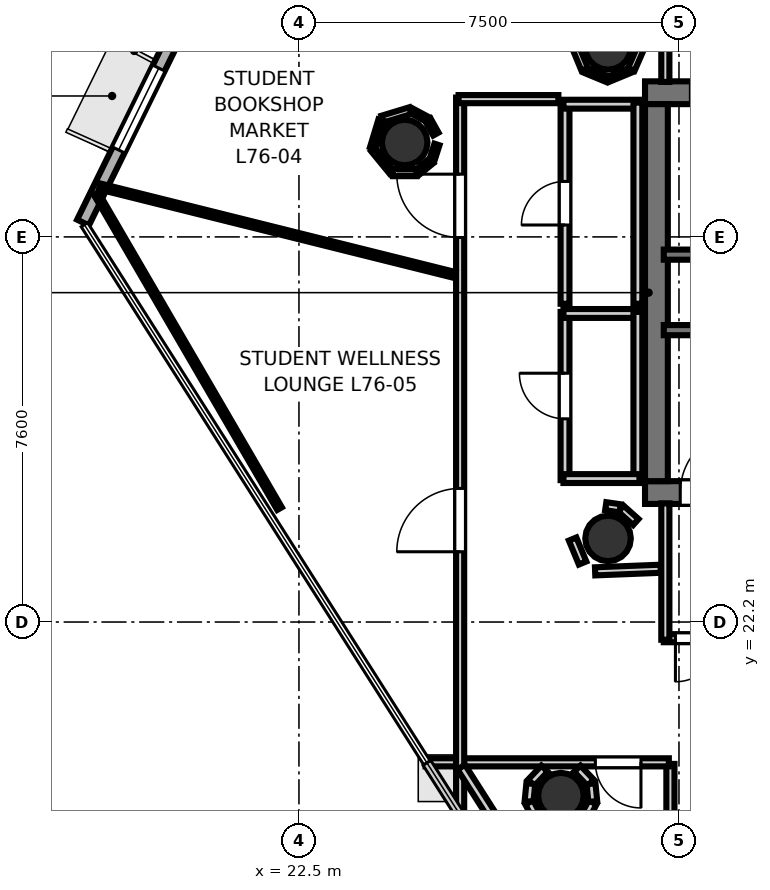
"""IFC4 building model, lengths in metres.
Left out: names, types, materials, properties, quantities, classifications, styles, units other than length and angle.
Written with IfcOpenShell. Run it as: python <this file> out.ifc"""

import sys

from ifc_helpers import new_model, si_unit, direction, frame, frame_2d, origin, origin_2d, place, context, subcontext, project, spatial, rectangle, hollow_circle, extrude, element, fill, save


model = new_model("IFC4")
c1 = context("Model", 3, precision=1e-05, world=origin(), true_north=direction((0.0, 1.0)))
c2 = subcontext(c1, "Body", "Model", "MODEL_VIEW")
j1 = project(units=[si_unit("LENGTHUNIT", "METRE"), si_unit("PLANEANGLEUNIT", "RADIAN")], contexts=[c1])
p1 = place(None, origin())
s1 = spatial("IfcSite", under=j1, at=p1, CompositionType="ELEMENT")
p2 = place(p1, origin())
s2 = spatial("IfcBuilding", under=s1, at=p2, CompositionType="ELEMENT")
p3 = place(p2, frame((0.0, 0.0, 295.4)))
s3 = spatial("IfcBuildingStorey", under=s2, at=p3, CompositionType="ELEMENT", Elevation=295.4)
p4 = place(p3, frame((29.33, 32.645, 0.0), z_axis=(0.0, 0.0, 1.0), x_axis=(1.0, 0.0, 0.0)))
e1 = element("IfcWall", 1, at=p4, inside=s3, PredefinedType="SHEAR", context=c2, shape_type="SweptSolid", body=[
    extrude(rectangle(XDim=10.52, YDim=0.45, at=frame_2d((5.26, 0.0))), origin(), (0.0, 0.0, 1.0), 3.52),
])
p5 = place(p4, frame((0.895, 0.0, 0.0)))
e2 = element("IfcOpeningElement", 2, at=p5, cuts=e1, PredefinedType="OPENING", context=c2, shape_type="SweptSolid", body=[
    extrude(rectangle(XDim=1.25, YDim=2.15, at=frame_2d((0.625, 1.075))), frame((0.0, 0.235, 0.0), z_axis=(0.0, -1.0, 0.0), x_axis=(1.0, 0.0, 0.0)), (0.0, 0.0, 1.0), 0.47),
])
p6 = place(p3, frame((29.33, 24.755, 0.0), z_axis=(0.0, 0.0, 1.0), x_axis=(1.0, 0.0, 0.0)))
e3 = element("IfcWall", 3, at=p6, inside=s3, PredefinedType="SHEAR", context=c2, shape_type="SweptSolid", body=[
    extrude(rectangle(XDim=10.52, YDim=0.45, at=frame_2d((5.26, 0.0))), origin(), (0.0, 0.0, 1.0), 3.52),
])
p7 = place(p6, frame((0.695, 0.0, 0.0)))
e4 = element("IfcOpeningElement", 4, at=p7, cuts=e3, PredefinedType="OPENING", context=c2, shape_type="SweptSolid", body=[
    extrude(rectangle(XDim=1.25, YDim=2.15, at=frame_2d((0.625, 1.075))), frame((0.0, 0.235, 0.0), z_axis=(0.0, -1.0, 0.0), x_axis=(1.0, 0.0, 0.0)), (0.0, 0.0, 1.0), 0.47),
])
p8 = place(p3, frame((29.555, 24.98, 0.0), z_axis=(0.0, 0.0, 1.0), x_axis=(0.0, 1.0, 0.0)))
e5 = element("IfcWall", 5, at=p8, inside=s3, PredefinedType="SHEAR", context=c2, shape_type="SweptSolid", body=[
    extrude(rectangle(XDim=7.44, YDim=0.45, at=frame_2d((3.72, 0.0))), origin(), (0.0, 0.0, 1.0), 3.52),
])
for number, where, z_axis, x_axis in (
    (6, (28.6, 33.55, 0.0), (0.0, 0.0, 1.0), (1.0, 0.0, 0.0)),
    (7, (28.6, 23.85, 0.0), (0.0, 0.0, 1.0), (1.0, 0.0, 0.0)),
    (8, (24.587, 31.663, 0.0), (0.0, 0.0, 1.0), (1.0, 0.0, 0.0)),
    (9, (27.67, 18.774, 0.0), (0.0, 0.0, 1.0), (1.0, 0.0, 0.0)),
):
    element("IfcColumn", number, at=place(p3, frame(where, z_axis=z_axis, x_axis=x_axis)), inside=s3, PredefinedType="COLUMN", context=c2, shape_type="SweptSolid", body=[
        extrude(hollow_circle(Radius=0.45, WallThickness=0.025, at=origin_2d()), origin(), (0.0, 0.0, 1.0), 3.7),
    ])
p9 = place(p3, frame((20.436, 34.563, 0.0), z_axis=(0.0, 0.0, 1.0), x_axis=(-0.440488239438, -0.897758381145, 0.0)))
e10 = element("IfcWall", 10, at=p9, inside=s3, PredefinedType="SOLIDWALL", context=c2, shape_type="SweptSolid", body=[
    extrude(rectangle(XDim=4.99, YDim=0.26, at=frame_2d((2.495, 0.0))), origin(), (0.0, 0.0, 1.0), 3.52),
])
p10 = place(p9, frame((1.595, 0.0, 0.85)))
e11 = element("IfcOpeningElement", 11, at=p10, cuts=e10, PredefinedType="OPENING", context=c2, shape_type="SweptSolid", body=[
    extrude(rectangle(XDim=1.8, YDim=2.1, at=frame_2d((0.9, 1.05))), frame((0.0, 0.14, 0.0), z_axis=(0.0, -1.0, 0.0), x_axis=(1.0, 0.0, 0.0)), (0.0, 0.0, 1.0), 0.28),
])
p11 = place(p3, frame((29.7, 29.45, 0.0), z_axis=(0.0, 0.0, 1.0), x_axis=(1.0, 0.0, 0.0)))
e12 = element("IfcWall", 12, at=p11, inside=s3, PredefinedType="SOLIDWALL", context=c2, shape_type="SweptSolid", body=[
    extrude(rectangle(XDim=8.3, YDim=0.2, at=frame_2d((4.15, 0.0))), origin(), (0.0, 0.0, 1.0), 3.52),
])
p12 = place(p3, frame((29.7, 27.96, 0.0), z_axis=(0.0, 0.0, 1.0), x_axis=(1.0, 0.0, 0.0)))
e13 = element("IfcWall", 13, at=p12, inside=s3, PredefinedType="SOLIDWALL", context=c2, shape_type="SweptSolid", body=[
    extrude(rectangle(XDim=7.75, YDim=0.2, at=frame_2d((3.875, 0.0))), origin(), (0.0, 0.0, 1.0), 3.52),
])
p13 = place(p3, frame((29.731, 32.858, 0.0), z_axis=(0.0, 0.0, 1.0), x_axis=(0.0, 1.0, 0.0)))
e14 = element("IfcWall", 14, at=p13, inside=s3, PredefinedType="PARTITIONING", context=c2, shape_type="SweptSolid", body=[
    extrude(rectangle(XDim=3.053, YDim=0.16, at=frame_2d((1.526, 0.0))), origin(), (0.0, 0.0, 1.0), 2.84),
])
p14 = place(p3, frame((33.45, 21.881, 0.0), z_axis=(0.0, 0.0, 1.0), x_axis=(-1.0, 0.0, 0.0)))
e15 = element("IfcWall", 15, at=p14, inside=s3, PredefinedType="PARTITIONING", context=c2, shape_type="SweptSolid", body=[
    extrude(rectangle(XDim=3.75, YDim=0.16, at=frame_2d((1.875, 0.0))), origin(), (0.0, 0.0, 1.0), 2.84),
])
p15 = place(p14, frame((1.275, 0.0, 0.0)))
e16 = element("IfcOpeningElement", 16, at=p15, cuts=e15, PredefinedType="OPENING", context=c2, shape_type="SweptSolid", body=[
    extrude(rectangle(XDim=1.2, YDim=2.15, at=frame_2d((0.6, 1.075))), frame((0.0, 0.09, 0.0), z_axis=(0.0, -1.0, 0.0), x_axis=(1.0, 0.0, 0.0)), (0.0, 0.0, 1.0), 0.18),
])
p16 = place(p14, frame((2.66, 0.0, 0.0)))
e17 = element("IfcOpeningElement", 17, at=p16, cuts=e15, PredefinedType="OPENING", context=c2, shape_type="SweptSolid", body=[
    extrude(rectangle(XDim=0.86, YDim=2.05, at=frame_2d((0.43, 1.025))), frame((0.0, 0.09, 0.0), z_axis=(0.0, -1.0, 0.0), x_axis=(1.0, 0.0, 0.0)), (0.0, 0.0, 1.0), 0.18),
])
p17 = place(p3, frame((29.731, 21.85, 0.0), z_axis=(0.0, 0.0, 1.0), x_axis=(0.0, 1.0, 0.0)))
e18 = element("IfcWall", 18, at=p17, inside=s3, PredefinedType="PARTITIONING", context=c2, shape_type="SweptSolid", body=[
    extrude(rectangle(XDim=2.692, YDim=0.16, at=frame_2d((1.346, 0.0))), origin(), (0.0, 0.0, 1.0), 2.84),
])
p18 = place(p3, frame((27.751, 25.0, 0.0), z_axis=(0.0, 0.0, 1.0), x_axis=(0.0, 1.0, 0.0)))
e19 = element("IfcWall", 19, at=p18, inside=s3, PredefinedType="PLUMBINGWALL", context=c2, shape_type="SweptSolid", body=[
    extrude(rectangle(XDim=3.32, YDim=0.175, at=frame_2d((1.66, 0.0))), origin(), (0.0, 0.0, 1.0), 2.84),
])
p19 = place(p18, frame((1.21, 0.0, 0.0)))
e20 = element("IfcOpeningElement", 20, at=p19, cuts=e19, PredefinedType="OPENING", context=c2, shape_type="SweptSolid", body=[
    extrude(rectangle(XDim=0.9, YDim=2.1, at=frame_2d((0.45, 1.05))), frame((0.0, 0.097, 0.0), z_axis=(0.0, -1.0, 0.0), x_axis=(1.0, 0.0, 0.0)), (0.0, 0.0, 1.0), 0.195),
])
p20 = place(p3, frame((27.72, 28.289, 0.0), z_axis=(0.0, 0.0, 1.0), x_axis=(1.0, 0.0, 0.0)))
e21 = element("IfcWall", 21, at=p20, inside=s3, PredefinedType="PLUMBINGWALL", context=c2, shape_type="SweptSolid", body=[
    extrude(rectangle(XDim=1.5, YDim=0.175, at=frame_2d((0.75, 0.0))), origin(), (0.0, 0.0, 1.0), 2.84),
])
p21 = place(p3, frame((29.189, 28.32, 0.0), z_axis=(0.0, 0.0, 1.0), x_axis=(0.0, -1.0, 0.0)))
e22 = element("IfcWall", 22, at=p21, inside=s3, PredefinedType="PLUMBINGWALL", context=c2, shape_type="SweptSolid", body=[
    extrude(rectangle(XDim=3.32, YDim=0.175, at=frame_2d((1.66, 0.0))), origin(), (0.0, 0.0, 1.0), 2.84),
])
p22 = place(p3, frame((29.22, 25.031, 0.0), z_axis=(0.0, 0.0, 1.0), x_axis=(-1.0, 0.0, 0.0)))
e23 = element("IfcWall", 23, at=p22, inside=s3, PredefinedType="PLUMBINGWALL", context=c2, shape_type="SweptSolid", body=[
    extrude(rectangle(XDim=1.5, YDim=0.175, at=frame_2d((0.75, 0.0))), origin(), (0.0, 0.0, 1.0), 2.84),
])
p23 = place(p3, frame((27.751, 28.48, 0.0), z_axis=(0.0, 0.0, 1.0), x_axis=(0.0, 1.0, 0.0)))
e24 = element("IfcWall", 24, at=p23, inside=s3, PredefinedType="PLUMBINGWALL", context=c2, shape_type="SweptSolid", body=[
    extrude(rectangle(XDim=3.97, YDim=0.175, at=frame_2d((1.985, 0.0))), origin(), (0.0, 0.0, 1.0), 2.84),
])
p24 = place(p23, frame((1.555, 0.0, 0.0)))
e25 = element("IfcOpeningElement", 25, at=p24, cuts=e24, PredefinedType="OPENING", context=c2, shape_type="SweptSolid", body=[
    extrude(rectangle(XDim=0.86, YDim=2.05, at=frame_2d((0.43, 1.025))), frame((0.0, 0.097, 0.0), z_axis=(0.0, -1.0, 0.0), x_axis=(1.0, 0.0, 0.0)), (0.0, 0.0, 1.0), 0.195),
])
p25 = place(p3, frame((27.72, 32.419, 0.0), z_axis=(0.0, 0.0, 1.0), x_axis=(1.0, 0.0, 0.0)))
e26 = element("IfcWall", 26, at=p25, inside=s3, PredefinedType="PLUMBINGWALL", context=c2, shape_type="SweptSolid", body=[
    extrude(rectangle(XDim=1.5, YDim=0.175, at=frame_2d((0.75, 0.0))), origin(), (0.0, 0.0, 1.0), 2.84),
])
p26 = place(p3, frame((29.189, 32.45, 0.0), z_axis=(0.0, 0.0, 1.0), x_axis=(0.0, -1.0, 0.0)))
e27 = element("IfcWall", 27, at=p26, inside=s3, PredefinedType="PLUMBINGWALL", context=c2, shape_type="SweptSolid", body=[
    extrude(rectangle(XDim=3.97, YDim=0.175, at=frame_2d((1.985, 0.0))), origin(), (0.0, 0.0, 1.0), 2.84),
])
p27 = place(p3, frame((29.149, 24.173, 0.0), z_axis=(0.0, 0.0, 1.0), x_axis=(-0.745225165416, 0.666812906917, 0.0)))
e28 = element("IfcWall", 28, at=p27, inside=s3, PredefinedType="PARTITIONING", context=c2, shape_type="SweptSolid", body=[
    extrude(rectangle(XDim=0.396, YDim=0.16, at=frame_2d((0.198, 0.0))), origin(), (0.0, 0.0, 1.0), 2.84),
])
p28 = place(p3, frame((28.838, 24.444, 0.0), z_axis=(0.0, 0.0, 1.0), x_axis=(-0.989449148305, 0.144880581578, 0.0)))
e29 = element("IfcWall", 29, at=p28, inside=s3, PredefinedType="PARTITIONING", context=c2, shape_type="SweptSolid", body=[
    extrude(rectangle(XDim=0.286, YDim=0.16, at=frame_2d((0.143, 0.0))), origin(), (0.0, 0.0, 1.0), 2.84),
])
p29 = place(p3, frame((27.901, 23.838, 0.0), z_axis=(0.0, 0.0, 1.0), x_axis=(0.382856448334, -0.923807847969, 0.0)))
e30 = element("IfcWall", 30, at=p29, inside=s3, PredefinedType="PARTITIONING", context=c2, shape_type="SweptSolid", body=[
    extrude(rectangle(XDim=0.513, YDim=0.16, at=frame_2d((0.256, 0.0))), origin(), (0.0, 0.0, 1.0), 2.84),
])
p30 = place(p3, frame((28.345, 23.2, 0.0), z_axis=(0.0, 0.0, 1.0), x_axis=(0.999216536924, 0.039576664043, 0.0)))
e31 = element("IfcWall", 31, at=p30, inside=s3, PredefinedType="PARTITIONING", context=c2, shape_type="SweptSolid", body=[
    extrude(rectangle(XDim=1.295, YDim=0.16, at=frame_2d((0.648, 0.0))), origin(), (0.0, 0.0, 1.0), 2.84),
])
p31 = place(p3, frame((29.831, 16.05, 0.0), z_axis=(0.0, 0.0, 1.0), x_axis=(0.0, 1.0, 0.0)))
e32 = element("IfcWall", 32, at=p31, inside=s3, PredefinedType="PARTITIONING", context=c2, shape_type="SweptSolid", body=[
    extrude(rectangle(XDim=3.35, YDim=0.16, at=frame_2d((1.675, 0.0))), origin(), (0.0, 0.0, 1.0), 2.84),
])
p32 = place(p3, frame((29.8, 19.431, 0.0), z_axis=(0.0, 0.0, 1.0), x_axis=(-1.0, 0.0, 0.0)))
e33 = element("IfcWall", 33, at=p32, inside=s3, PredefinedType="PARTITIONING", context=c2, shape_type="SweptSolid", body=[
    extrude(rectangle(XDim=4.801, YDim=0.16, at=frame_2d((2.4, 0.0))), origin(), (0.0, 0.0, 1.0), 2.84),
])
p33 = place(p32, frame((0.55, 0.0, 0.0)))
e34 = element("IfcOpeningElement", 34, at=p33, cuts=e33, PredefinedType="OPENING", context=c2, shape_type="SweptSolid", body=[
    extrude(rectangle(XDim=0.9, YDim=2.1, at=frame_2d((0.45, 1.05))), frame((0.0, 0.09, 0.0), z_axis=(0.0, -1.0, 0.0), x_axis=(1.0, 0.0, 0.0)), (0.0, 0.0, 1.0), 0.18),
])
p34 = place(p3, frame((25.681, 18.372, 0.0), z_axis=(0.0, 0.0, 1.0), x_axis=(0.0, 1.0, 0.0)))
e35 = element("IfcWall", 35, at=p34, inside=s3, PredefinedType="PARTITIONING", context=c2, shape_type="SweptSolid", body=[
    extrude(rectangle(XDim=14.178, YDim=0.16, at=frame_2d((7.089, 0.0))), origin(), (0.0, 0.0, 1.0), 2.84),
])
p35 = place(p34, frame((11.417, 0.0, 0.0)))
e36 = element("IfcOpeningElement", 36, at=p35, cuts=e35, PredefinedType="OPENING", context=c2, shape_type="SweptSolid", body=[
    extrude(rectangle(XDim=1.25, YDim=2.2, at=frame_2d((0.625, 1.1))), frame((0.0, 0.09, 0.0), z_axis=(0.0, -1.0, 0.0), x_axis=(1.0, 0.0, 0.0)), (0.0, 0.0, 1.0), 0.18),
])
p36 = place(p34, frame((5.215, 0.0, 0.0)))
e37 = element("IfcOpeningElement", 37, at=p36, cuts=e35, PredefinedType="OPENING", context=c2, shape_type="SweptSolid", body=[
    extrude(rectangle(XDim=1.25, YDim=2.2, at=frame_2d((0.625, 1.1))), frame((0.0, 0.09, 0.0), z_axis=(0.0, -1.0, 0.0), x_axis=(1.0, 0.0, 0.0)), (0.0, 0.0, 1.0), 0.18),
])
p37 = place(p3, frame((25.65, 32.519, 0.0), z_axis=(0.0, 0.0, 1.0), x_axis=(1.0, 0.0, 0.0)))
e38 = element("IfcWall", 38, at=p37, inside=s3, PredefinedType="PARTITIONING", context=c2, shape_type="SweptSolid", body=[
    extrude(rectangle(XDim=1.97, YDim=0.16, at=frame_2d((0.985, 0.0))), origin(), (0.0, 0.0, 1.0), 2.84),
])
p38 = place(p3, frame((29.231, 13.794, 0.0), z_axis=(0.0, 0.0, 1.0), x_axis=(-0.5370149386, 0.843572732916, 0.0)))
e39 = element("IfcWall", 39, at=p38, inside=s3, PredefinedType="PLUMBINGWALL", context=c2, shape_type="SweptSolid", body=[
    extrude(rectangle(XDim=6.57, YDim=0.175, at=frame_2d((3.285, 0.0))), origin(), (0.0, 0.0, 1.0), 2.095),
])
p39 = place(p3, frame((27.347, 19.306, 0.0), z_axis=(0.0, 0.0, 1.0), x_axis=(-0.68932010071, -0.724456899171, 0.0)))
e40 = element("IfcWall", 40, at=p39, inside=s3, PredefinedType="PLUMBINGWALL", context=c2, shape_type="SweptSolid", body=[
    extrude(rectangle(XDim=0.382, YDim=0.175, at=frame_2d((0.191, 0.0))), origin(), (0.0, 0.0, 1.0), 2.84),
])
p40 = place(p3, frame((27.076, 19.01, 0.0), z_axis=(0.0, 0.0, 1.0), x_axis=(-0.097865889817, -0.995199611942, 0.0)))
e41 = element("IfcWall", 41, at=p40, inside=s3, PredefinedType="PLUMBINGWALL", context=c2, shape_type="SweptSolid", body=[
    extrude(rectangle(XDim=0.354, YDim=0.175, at=frame_2d((0.177, 0.0))), origin(), (0.0, 0.0, 1.0), 2.095),
])
p41 = place(p3, frame((27.044, 18.64, 0.0), z_axis=(0.0, 0.0, 1.0), x_axis=(0.471053526925, -0.882104628019, 0.0)))
e42 = element("IfcWall", 42, at=p41, inside=s3, PredefinedType="PLUMBINGWALL", context=c2, shape_type="SweptSolid", body=[
    extrude(rectangle(XDim=0.354, YDim=0.175, at=frame_2d((0.177, 0.0))), origin(), (0.0, 0.0, 1.0), 2.095),
])
p42 = place(p3, frame((28.129, 18.328, 0.0), z_axis=(0.0, 0.0, 1.0), x_axis=(0.471589913721, 0.881817981942, 0.0)))
e43 = element("IfcWall", 43, at=p42, inside=s3, PredefinedType="PLUMBINGWALL", context=c2, shape_type="SweptSolid", body=[
    extrude(rectangle(XDim=0.354, YDim=0.175, at=frame_2d((0.177, 0.0))), origin(), (0.0, 0.0, 1.0), 2.84),
])
p43 = place(p3, frame((28.299, 18.658, 0.0), z_axis=(0.0, 0.0, 1.0), x_axis=(-0.097865889817, 0.995199611942, 0.0)))
e44 = element("IfcWall", 44, at=p43, inside=s3, PredefinedType="PLUMBINGWALL", context=c2, shape_type="SweptSolid", body=[
    extrude(rectangle(XDim=0.354, YDim=0.175, at=frame_2d((0.177, 0.0))), origin(), (0.0, 0.0, 1.0), 2.84),
])
p44 = place(p3, frame((28.256, 19.029, 0.0), z_axis=(0.0, 0.0, 1.0), x_axis=(-0.68932010071, 0.724456899171, 0.0)))
e45 = element("IfcWall", 45, at=p44, inside=s3, PredefinedType="PLUMBINGWALL", context=c2, shape_type="SweptSolid", body=[
    extrude(rectangle(XDim=0.382, YDim=0.175, at=frame_2d((0.191, 0.0))), origin(), (0.0, 0.0, 1.0), 2.84),
])
p45 = place(p3, frame((25.203, 31.829, 0.0), z_axis=(0.0, 0.0, 1.0), x_axis=(-0.488926990846, 0.872324708823, 0.0)))
e46 = element("IfcWall", 46, at=p45, inside=s3, PredefinedType="PARTITIONING", context=c2, shape_type="SweptSolid", body=[
    extrude(rectangle(XDim=0.322, YDim=0.12, at=frame_2d((0.161, 0.0))), origin(), (0.0, 0.0, 1.0), 2.84),
])
p46 = place(p3, frame((25.033, 32.122, 0.0), z_axis=(0.0, 0.0, 1.0), x_axis=(-0.881817981942, 0.471589913721, 0.0)))
e47 = element("IfcWall", 47, at=p46, inside=s3, PredefinedType="PARTITIONING", context=c2, shape_type="SweptSolid", body=[
    extrude(rectangle(XDim=0.354, YDim=0.105, at=frame_2d((0.177, 0.0))), origin(), (0.0, 0.0, 1.0), 2.84),
])
p47 = place(p3, frame((24.697, 32.291, 0.0), z_axis=(0.0, 0.0, 1.0), x_axis=(-0.956910072495, -0.290384423064, 0.0)))
e48 = element("IfcWall", 48, at=p47, inside=s3, PredefinedType="PARTITIONING", context=c2, shape_type="SweptSolid", body=[
    extrude(rectangle(XDim=0.575, YDim=0.14, at=frame_2d((0.288, 0.0))), origin(), (0.0, 0.0, 1.0), 2.84),
])
p48 = place(p3, frame((24.126, 32.103, 0.0), z_axis=(0.0, 0.0, 1.0), x_axis=(-0.290384423064, -0.956910072495, 0.0)))
e49 = element("IfcWall", 49, at=p48, inside=s3, PredefinedType="PARTITIONING", context=c2, shape_type="SweptSolid", body=[
    extrude(rectangle(XDim=0.575, YDim=0.12, at=frame_2d((0.288, 0.0))), origin(), (0.0, 0.0, 1.0), 2.84),
])
p49 = place(p3, frame((23.965, 31.524, 0.0), z_axis=(0.0, 0.0, 1.0), x_axis=(0.634277575631, -0.77310539841, 0.0)))
e50 = element("IfcWall", 50, at=p49, inside=s3, PredefinedType="PARTITIONING", context=c2, shape_type="SweptSolid", body=[
    extrude(rectangle(XDim=0.575, YDim=0.105, at=frame_2d((0.288, 0.0))), origin(), (0.0, 0.0, 1.0), 2.84),
])
p50 = place(p3, frame((24.354, 31.068, 0.0), z_axis=(0.0, 0.0, 1.0), x_axis=(1.0, 0.0, 0.0)))
e51 = element("IfcWall", 51, at=p50, inside=s3, PredefinedType="PARTITIONING", context=c2, shape_type="SweptSolid", body=[
    extrude(rectangle(XDim=0.467, YDim=0.14, at=frame_2d((0.233, 0.0))), origin(), (0.0, 0.0, 1.0), 2.84),
])
p51 = place(p3, frame((24.84, 31.075, 0.0), z_axis=(0.0, 0.0, 1.0), x_axis=(0.773281307259, 0.634063103992, 0.0)))
e52 = element("IfcWall", 52, at=p51, inside=s3, PredefinedType="PARTITIONING", context=c2, shape_type="SweptSolid", body=[
    extrude(rectangle(XDim=0.354, YDim=0.12, at=frame_2d((0.177, 0.0))), origin(), (0.0, 0.0, 1.0), 2.84),
])
p52 = place(p3, frame((25.124, 31.315, 0.0), z_axis=(0.0, 0.0, 1.0), x_axis=(0.306761714687, 0.951786347035, 0.0)))
e53 = element("IfcWall", 53, at=p52, inside=s3, PredefinedType="PARTITIONING", context=c2, shape_type="SweptSolid", body=[
    extrude(rectangle(XDim=0.325, YDim=0.105, at=frame_2d((0.163, 0.0))), origin(), (0.0, 0.0, 1.0), 2.84),
])
p53 = place(p3, frame((25.577, 29.048, 0.0), z_axis=(0.0, 0.0, 1.0), x_axis=(-0.970297325038, 0.241915483226, 0.0)))
e54 = element("IfcWall", 54, at=p53, inside=s3, PredefinedType="PARTITIONING", context=c2, shape_type="SweptSolid", body=[
    extrude(rectangle(XDim=7.226, YDim=0.12, at=frame_2d((3.613, 0.0))), origin(), (0.0, 0.0, 1.0), 2.84),
])
p54 = place(p3, frame((27.961, 33.538, 0.0), z_axis=(0.0, 0.0, 1.0), x_axis=(0.382274809242, -0.924048683901, 0.0)))
e55 = element("IfcWall", 55, at=p54, inside=s3, PredefinedType="PARTITIONING", context=c2, shape_type="SweptSolid", body=[
    extrude(rectangle(XDim=0.467, YDim=0.14, at=frame_2d((0.233, 0.0))), origin(), (0.0, 0.0, 1.0), 2.84),
])
p55 = place(p3, frame((28.157, 33.09, 0.0), z_axis=(0.0, 0.0, 1.0), x_axis=(0.923863886655, -0.382721202621, 0.0)))
e56 = element("IfcWall", 56, at=p55, inside=s3, PredefinedType="PARTITIONING", context=c2, shape_type="SweptSolid", body=[
    extrude(rectangle(XDim=0.467, YDim=0.12, at=frame_2d((0.233, 0.0))), origin(), (0.0, 0.0, 1.0), 2.84),
])
p56 = place(p3, frame((28.612, 32.911, 0.0), z_axis=(0.0, 0.0, 1.0), x_axis=(0.923863886655, 0.382721202621, 0.0)))
e57 = element("IfcWall", 57, at=p56, inside=s3, PredefinedType="PARTITIONING", context=c2, shape_type="SweptSolid", body=[
    extrude(rectangle(XDim=0.467, YDim=0.105, at=frame_2d((0.233, 0.0))), origin(), (0.0, 0.0, 1.0), 2.84),
])
p57 = place(p3, frame((29.06, 33.106, 0.0), z_axis=(0.0, 0.0, 1.0), x_axis=(0.400352069216, 0.916361402872, 0.0)))
e58 = element("IfcWall", 58, at=p57, inside=s3, PredefinedType="PARTITIONING", context=c2, shape_type="SweptSolid", body=[
    extrude(rectangle(XDim=0.439, YDim=0.14, at=frame_2d((0.219, 0.0))), origin(), (0.0, 0.0, 1.0), 2.84),
])
p58 = place(p3, frame((22.117, 24.438, 0.0), z_axis=(0.0, 0.0, 1.0), x_axis=(-0.50301807404, 0.864275891825, 0.0)))
e59 = element("IfcWall", 59, at=p58, inside=s3, PredefinedType="PARTITIONING", context=c2, shape_type="SweptSolid", body=[
    extrude(rectangle(XDim=7.192, YDim=0.105, at=frame_2d((3.596, 0.0))), origin(), (0.0, 0.0, 1.0), 2.84),
])
p59 = place(p7, origin())
e60 = element("IfcDoor", 60, at=p59, inside=s3, OperationType="SINGLE_SWING_RIGHT", PredefinedType="DOOR", context=c2, shape_type="SweptSolid", body=[
    extrude(rectangle(XDim=1.25, YDim=2.15, at=frame_2d((0.625, 1.075))), frame((0.0, 0.025, 0.0), z_axis=(0.0, -1.0, 0.0), x_axis=(1.0, 0.0, 0.0)), (0.0, 0.0, 1.0), 0.05),
])
fill(e4, e60)
p60 = place(p19, origin())
e61 = element("IfcDoor", 61, at=p60, inside=s3, OperationType="SINGLE_SWING_RIGHT", PredefinedType="DOOR", context=c2, shape_type="SweptSolid", body=[
    extrude(rectangle(XDim=0.9, YDim=2.1, at=frame_2d((0.45, 1.05))), frame((0.0, 0.025, 0.0), z_axis=(0.0, -1.0, 0.0), x_axis=(1.0, 0.0, 0.0)), (0.0, 0.0, 1.0), 0.05),
])
fill(e20, e61)
p61 = place(p24, origin())
e62 = element("IfcDoor", 62, at=p61, inside=s3, OperationType="SINGLE_SWING_LEFT", PredefinedType="DOOR", context=c2, shape_type="SweptSolid", body=[
    extrude(rectangle(XDim=0.86, YDim=2.05, at=frame_2d((0.43, 1.025))), frame((0.0, 0.025, 0.0), z_axis=(0.0, -1.0, 0.0), x_axis=(1.0, 0.0, 0.0)), (0.0, 0.0, 1.0), 0.05),
])
fill(e25, e62)
p62 = place(p16, origin())
e63 = element("IfcDoor", 63, at=p62, inside=s3, OperationType="SINGLE_SWING_RIGHT", PredefinedType="DOOR", context=c2, shape_type="SweptSolid", body=[
    extrude(rectangle(XDim=0.86, YDim=2.05, at=frame_2d((0.43, 1.025))), frame((0.0, 0.025, 0.0), z_axis=(0.0, -1.0, 0.0), x_axis=(1.0, 0.0, 0.0)), (0.0, 0.0, 1.0), 0.05),
])
fill(e17, e63)
p63 = place(p33, origin())
e64 = element("IfcDoor", 64, at=p63, inside=s3, OperationType="SINGLE_SWING_LEFT", PredefinedType="DOOR", context=c2, shape_type="SweptSolid", body=[
    extrude(rectangle(XDim=0.9, YDim=2.1, at=frame_2d((0.45, 1.05))), frame((0.0, 0.025, 0.0), z_axis=(0.0, -1.0, 0.0), x_axis=(1.0, 0.0, 0.0)), (0.0, 0.0, 1.0), 0.05),
])
fill(e34, e64)
p64 = place(p35, origin())
e65 = element("IfcDoor", 65, at=p64, inside=s3, OperationType="SINGLE_SWING_RIGHT", PredefinedType="DOOR", context=c2, shape_type="SweptSolid", body=[
    extrude(rectangle(XDim=1.25, YDim=2.2, at=frame_2d((0.625, 1.1))), frame((0.0, 0.025, 0.0), z_axis=(0.0, -1.0, 0.0), x_axis=(1.0, 0.0, 0.0)), (0.0, 0.0, 1.0), 0.05),
])
fill(e36, e65)
p65 = place(p36, origin())
e66 = element("IfcDoor", 66, at=p65, inside=s3, OperationType="SINGLE_SWING_LEFT", PredefinedType="DOOR", context=c2, shape_type="SweptSolid", body=[
    extrude(rectangle(XDim=1.25, YDim=2.2, at=frame_2d((0.625, 1.1))), frame((0.0, 0.025, 0.0), z_axis=(0.0, -1.0, 0.0), x_axis=(1.0, 0.0, 0.0)), (0.0, 0.0, 1.0), 0.05),
])
fill(e37, e66)
p66 = place(p10, origin())
e67 = element("IfcWindow", 67, at=p66, inside=s3, PartitioningType="SINGLE_PANEL", PredefinedType="WINDOW", context=c2, shape_type="SweptSolid", body=[
    extrude(rectangle(XDim=1.8, YDim=2.1, at=frame_2d((0.9, 1.05))), frame((0.0, 0.03, 0.0), z_axis=(0.0, -1.0, 0.0), x_axis=(1.0, 0.0, 0.0)), (0.0, 0.0, 1.0), 0.06),
])
fill(e11, e67)
save(model, sys.argv[1])
